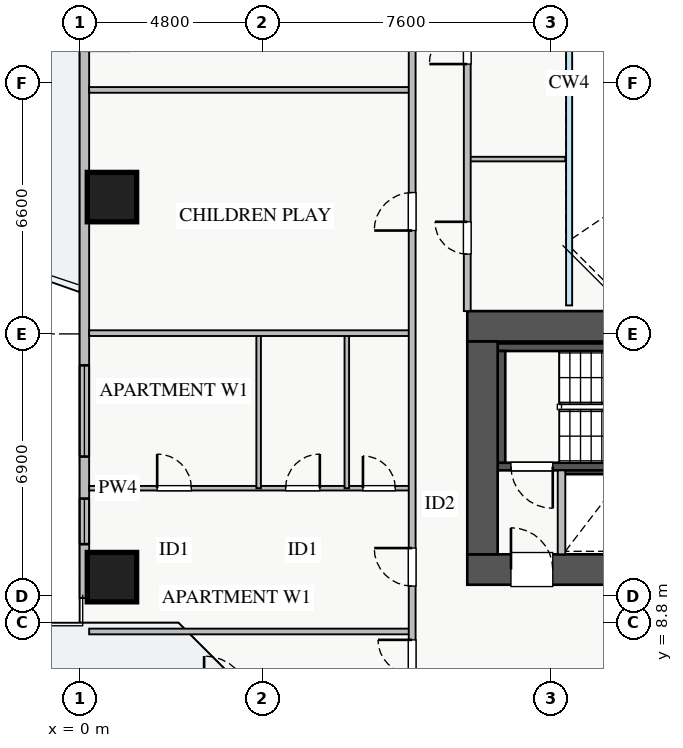
"""IFC4 building model, lengths in metres.
Left out: names, types, materials, properties, quantities, classifications, styles, units other than length and angle.
Written with IfcOpenShell. Run it as: python <this file> out.ifc"""

import sys

from ifc_helpers import new_model, si_unit, direction, frame, frame_2d, origin, origin_2d, place, context, subcontext, project, spatial, rectangle, extrude, source, transform, mapped, element, fill, save


model = new_model("IFC4")
c1 = context("Model", 3, precision=1e-05, world=origin(), true_north=direction((0.0, 1.0)))
c2 = subcontext(c1, "Body", "Model", "MODEL_VIEW")
j1 = project(units=[si_unit("LENGTHUNIT", "METRE"), si_unit("PLANEANGLEUNIT", "RADIAN")], contexts=[c1])
p1 = place(None, origin())
s1 = spatial("IfcSite", under=j1, at=p1, CompositionType="ELEMENT")
p2 = place(p1, origin())
s2 = spatial("IfcBuilding", under=s1, at=p2, CompositionType="ELEMENT")
p3 = place(p2, frame((0.0, 0.0, 63.25)))
s3 = spatial("IfcBuildingStorey", under=s2, at=p3, CompositionType="ELEMENT", Elevation=63.25)
p4 = place(p3, frame((12.68, 12.8, 0.0), z_axis=(0.0, 0.0, 1.0), x_axis=(1.0, 0.0, 0.0)))
e1 = element("IfcWall", 1, at=p4, inside=s3, PredefinedType="SHEAR", context=c2, shape_type="SweptSolid", body=[
    extrude(rectangle(XDim=1.94, YDim=0.18, at=frame_2d((0.97, 0.0))), origin(), (0.0, 0.0, 1.0), 3.07),
])
p5 = place(p3, frame((11.0, 12.91, 0.0), z_axis=(0.0, 0.0, 1.0), x_axis=(1.0, 0.0, 0.0)))
e2 = element("IfcWall", 2, at=p5, inside=s3, PredefinedType="SHEAR", context=c2, shape_type="SweptSolid", body=[
    extrude(rectangle(XDim=7.15, YDim=0.2, at=frame_2d((3.575, 0.0))), origin(), (0.0, 0.0, 1.0), 3.25),
])
p6 = place(p5, frame((0.35, 0.0, 0.0)))
e3 = element("IfcOpeningElement", 3, at=p6, cuts=e2, PredefinedType="OPENING", context=c2, shape_type="SweptSolid", body=[
    extrude(rectangle(XDim=1.1, YDim=2.05, at=frame_2d((0.55, 1.025))), frame((0.0, 0.11, 0.0), z_axis=(0.0, -1.0, 0.0), x_axis=(1.0, 0.0, 0.0)), (0.0, 0.0, 1.0), 0.22),
])
p7 = place(p3, frame((11.0, 16.05, 0.0), z_axis=(0.0, 0.0, 1.0), x_axis=(1.0, 0.0, 0.0)))
e4 = element("IfcWall", 4, at=p7, inside=s3, PredefinedType="SHEAR", context=c2, shape_type="SweptSolid", body=[
    extrude(rectangle(XDim=7.15, YDim=0.2, at=frame_2d((3.575, 0.0))), origin(), (0.0, 0.0, 1.0), 3.25),
])
p8 = place(p3, frame((11.1, 13.01, 0.0), z_axis=(0.0, 0.0, 1.0), x_axis=(0.0, 1.0, 0.0)))
e5 = element("IfcWall", 5, at=p8, inside=s3, PredefinedType="SHEAR", context=c2, shape_type="SweptSolid", body=[
    extrude(rectangle(XDim=2.94, YDim=0.2, at=frame_2d((1.47, 0.0))), origin(), (0.0, 0.0, 1.0), 3.25),
])
p9 = place(p3, frame((10.2, 10.2, 0.0), z_axis=(0.0, 0.0, 1.0), x_axis=(1.0, 0.0, 0.0)))
e6 = element("IfcWall", 6, at=p9, inside=s3, PredefinedType="SHEAR", context=c2, shape_type="SweptSolid", body=[
    extrude(rectangle(XDim=17.6, YDim=0.8, at=frame_2d((8.8, 0.0))), origin(), (0.0, 0.0, 1.0), 3.25),
])
p10 = place(p9, frame((1.15, 0.0, 0.0)))
e7 = element("IfcOpeningElement", 7, at=p10, cuts=e6, PredefinedType="OPENING", context=c2, shape_type="SweptSolid", body=[
    extrude(rectangle(XDim=1.1, YDim=2.05, at=frame_2d((0.55, 1.025))), frame((0.0, 0.41, 0.0), z_axis=(0.0, -1.0, 0.0), x_axis=(1.0, 0.0, 0.0)), (0.0, 0.0, 1.0), 0.82),
])
p11 = place(p9, frame((8.3, 0.0, 0.0)))
e8 = element("IfcOpeningElement", 8, at=p11, cuts=e6, PredefinedType="OPENING", context=c2, shape_type="SweptSolid", body=[
    extrude(rectangle(XDim=1.1, YDim=2.05, at=frame_2d((0.55, 1.025))), frame((0.0, 0.41, 0.0), z_axis=(0.0, -1.0, 0.0), x_axis=(1.0, 0.0, 0.0)), (0.0, 0.0, 1.0), 0.82),
])
p12 = place(p9, frame((10.05, 0.0, 0.0)))
e9 = element("IfcOpeningElement", 9, at=p12, cuts=e6, PredefinedType="OPENING", context=c2, shape_type="SweptSolid", body=[
    extrude(rectangle(XDim=1.1, YDim=2.05, at=frame_2d((0.55, 1.025))), frame((0.0, 0.41, 0.0), z_axis=(0.0, -1.0, 0.0), x_axis=(1.0, 0.0, 0.0)), (0.0, 0.0, 1.0), 0.82),
])
p13 = place(p9, frame((14.74, 0.0, 0.0)))
e10 = element("IfcOpeningElement", 10, at=p13, cuts=e6, PredefinedType="OPENING", context=c2, shape_type="SweptSolid", body=[
    extrude(rectangle(XDim=1.0, YDim=2.05, at=frame_2d((0.5, 1.025))), frame((0.0, 0.41, 0.0), z_axis=(0.0, -1.0, 0.0), x_axis=(1.0, 0.0, 0.0)), (0.0, 0.0, 1.0), 0.82),
])
p14 = place(p9, frame((11.835, 0.0, 0.0)))
e11 = element("IfcOpeningElement", 11, at=p14, cuts=e6, PredefinedType="OPENING", context=c2, shape_type="SweptSolid", body=[
    extrude(rectangle(XDim=1.0, YDim=2.05, at=frame_2d((0.5, 1.025))), frame((0.0, 0.41, 0.0), z_axis=(0.0, -1.0, 0.0), x_axis=(1.0, 0.0, 0.0)), (0.0, 0.0, 1.0), 0.82),
])
p15 = place(p9, frame((13.37, 0.0, 0.0)))
e12 = element("IfcOpeningElement", 12, at=p15, cuts=e6, PredefinedType="OPENING", context=c2, shape_type="SweptSolid", body=[
    extrude(rectangle(XDim=1.0, YDim=2.05, at=frame_2d((0.5, 1.025))), frame((0.0, 0.41, 0.0), z_axis=(0.0, -1.0, 0.0), x_axis=(1.0, 0.0, 0.0)), (0.0, 0.0, 1.0), 0.82),
])
p16 = place(p3, frame((10.2, 16.6, 0.0), z_axis=(0.0, 0.0, 1.0), x_axis=(1.0, 0.0, 0.0)))
e13 = element("IfcWall", 13, at=p16, inside=s3, PredefinedType="SHEAR", context=c2, shape_type="SweptSolid", body=[
    extrude(rectangle(XDim=17.6, YDim=0.8, at=frame_2d((8.8, 0.0))), origin(), (0.0, 0.0, 1.0), 3.25),
])
p17 = place(p3, frame((10.6, 10.6, 0.0), z_axis=(0.0, 0.0, 1.0), x_axis=(0.0, 1.0, 0.0)))
e14 = element("IfcWall", 14, at=p17, inside=s3, PredefinedType="SHEAR", context=c2, shape_type="SweptSolid", body=[
    extrude(rectangle(XDim=5.6, YDim=0.8, at=frame_2d((2.8, 0.0))), origin(), (0.0, 0.0, 1.0), 3.25),
])
m1 = source(origin(), c2, "Body", "SweptSolid", [
    extrude(rectangle(XDim=1.3, YDim=1.3, at=origin_2d()), origin(), (0.0, 0.0, 1.0), 3.25),
])
for number, where, z_axis, x_axis in (
    (15, (0.85, 20.0, 0.0), (0.0, 0.0, 1.0), (1.0, 0.0, 0.0)),
    (16, (0.85, 10.0, 0.0), (0.0, 0.0, 1.0), (1.0, 0.0, 0.0)),
):
    element("IfcColumn", number, at=place(p3, frame(where, z_axis=z_axis, x_axis=x_axis)), inside=s3, PredefinedType="COLUMN", context=c2, shape_type="MappedRepresentation", body=[
        mapped(m1, transform((0.0, 0.0, 0.0), x_axis=(1.0, 0.0, 0.0), y_axis=(0.0, 1.0, 0.0), z_axis=(0.0, 0.0, 1.0), scale=1.0)),
    ])
p18 = place(p3, frame((0.125, 9.45, 0.0), z_axis=(0.0, 0.0, 1.0), x_axis=(0.0, 1.0, 0.0)))
e17 = element("IfcWall", 17, at=p18, inside=s3, PredefinedType="STANDARD", context=c2, shape_type="SweptSolid", body=[
    extrude(rectangle(XDim=27.1, YDim=0.25, at=frame_2d((13.55, 0.0))), origin(), (0.0, 0.0, 1.0), 2.61),
])
p19 = place(p18, frame((14.4, 0.0, 0.0)))
e18 = element("IfcOpeningElement", 18, at=p19, cuts=e17, PredefinedType="OPENING", context=c2, shape_type="SweptSolid", body=[
    extrude(rectangle(XDim=1.2, YDim=2.1, at=frame_2d((0.6, 1.05))), frame((0.0, 0.135, 0.0), z_axis=(0.0, -1.0, 0.0), x_axis=(1.0, 0.0, 0.0)), (0.0, 0.0, 1.0), 0.27),
])
p20 = place(p18, frame((1.417, 0.0, 0.9)))
e19 = element("IfcOpeningElement", 19, at=p20, cuts=e17, PredefinedType="OPENING", context=c2, shape_type="SweptSolid", body=[
    extrude(rectangle(XDim=1.2, YDim=1.4, at=frame_2d((0.6, 0.7))), frame((0.0, 0.135, 0.0), z_axis=(0.0, -1.0, 0.0), x_axis=(1.0, 0.0, 0.0)), (0.0, 0.0, 1.0), 0.27),
])
p21 = place(p18, frame((24.188, 0.0, 0.9)))
e20 = element("IfcOpeningElement", 20, at=p21, cuts=e17, PredefinedType="OPENING", context=c2, shape_type="SweptSolid", body=[
    extrude(rectangle(XDim=1.5, YDim=1.5, at=frame_2d((0.75, 0.75))), frame((0.0, 0.135, 0.0), z_axis=(0.0, -1.0, 0.0), x_axis=(1.0, 0.0, 0.0)), (0.0, 0.0, 1.0), 0.27),
])
p22 = place(p18, frame((3.722, 0.0, 0.9)))
e21 = element("IfcOpeningElement", 21, at=p22, cuts=e17, PredefinedType="OPENING", context=c2, shape_type="SweptSolid", body=[
    extrude(rectangle(XDim=2.4, YDim=1.5, at=frame_2d((1.2, 0.75))), frame((0.0, 0.135, 0.0), z_axis=(0.0, -1.0, 0.0), x_axis=(1.0, 0.0, 0.0)), (0.0, 0.0, 1.0), 0.27),
])
p23 = place(p18, frame((21.018, 0.0, 0.9)))
e22 = element("IfcOpeningElement", 22, at=p23, cuts=e17, PredefinedType="OPENING", context=c2, shape_type="SweptSolid", body=[
    extrude(rectangle(XDim=2.4, YDim=1.5, at=frame_2d((1.2, 0.75))), frame((0.0, 0.135, 0.0), z_axis=(0.0, -1.0, 0.0), x_axis=(1.0, 0.0, 0.0)), (0.0, 0.0, 1.0), 0.27),
])
p24 = place(p18, frame((18.6, 0.0, 0.9)))
e23 = element("IfcOpeningElement", 23, at=p24, cuts=e17, PredefinedType="OPENING", context=c2, shape_type="SweptSolid", body=[
    extrude(rectangle(XDim=0.9, YDim=1.2, at=frame_2d((0.45, 0.6))), frame((0.0, 0.135, 0.0), z_axis=(0.0, -1.0, 0.0), x_axis=(1.0, 0.0, 0.0)), (0.0, 0.0, 1.0), 0.27),
])
p25 = place(p3, frame((12.68, 10.6, 0.0), z_axis=(0.0, 0.0, 1.0), x_axis=(0.0, 1.0, 0.0)))
e24 = element("IfcWall", 24, at=p25, inside=s3, PredefinedType="PARTITIONING", context=c2, shape_type="SweptSolid", body=[
    extrude(rectangle(XDim=2.21, YDim=0.2, at=frame_2d((1.105, 0.0))), origin(), (0.0, 0.0, 1.0), 3.07),
])
p26 = place(p3, frame((0.25, 8.57, 0.0), z_axis=(0.0, 0.0, 1.0), x_axis=(1.0, 0.0, 0.0)))
e25 = element("IfcWall", 25, at=p26, inside=s3, PredefinedType="PARTITIONING", context=c2, shape_type="SweptSolid", body=[
    extrude(rectangle(XDim=8.5, YDim=0.15, at=frame_2d((4.25, 0.0))), origin(), (0.0, 0.0, 1.0), 3.07),
])
p27 = place(p3, frame((0.25, 12.34, 0.0), z_axis=(0.0, 0.0, 1.0), x_axis=(1.0, 0.0, 0.0)))
e26 = element("IfcWall", 26, at=p27, inside=s3, PredefinedType="PLUMBINGWALL", context=c2, shape_type="SweptSolid", body=[
    extrude(rectangle(XDim=8.5, YDim=0.12, at=frame_2d((4.25, 0.0))), origin(), (0.0, 0.0, 1.0), 3.07),
])
p28 = place(p27, frame((1.79, 0.0, 0.0)))
e27 = element("IfcOpeningElement", 27, at=p28, cuts=e26, PredefinedType="OPENING", context=c2, shape_type="SweptSolid", body=[
    extrude(rectangle(XDim=0.9, YDim=2.05, at=frame_2d((0.45, 1.025))), frame((0.0, 0.07, 0.0), z_axis=(0.0, -1.0, 0.0), x_axis=(1.0, 0.0, 0.0)), (0.0, 0.0, 1.0), 0.14),
])
p29 = place(p27, frame((5.17, 0.0, 0.0)))
e28 = element("IfcOpeningElement", 28, at=p29, cuts=e26, PredefinedType="OPENING", context=c2, shape_type="SweptSolid", body=[
    extrude(rectangle(XDim=0.9, YDim=2.05, at=frame_2d((0.45, 1.025))), frame((0.0, 0.07, 0.0), z_axis=(0.0, -1.0, 0.0), x_axis=(1.0, 0.0, 0.0)), (0.0, 0.0, 1.0), 0.14),
])
p30 = place(p27, frame((7.205, 0.0, 0.0)))
e29 = element("IfcOpeningElement", 29, at=p30, cuts=e26, PredefinedType="OPENING", context=c2, shape_type="SweptSolid", body=[
    extrude(rectangle(XDim=0.85, YDim=2.05, at=frame_2d((0.425, 1.025))), frame((0.0, 0.07, 0.0), z_axis=(0.0, -1.0, 0.0), x_axis=(1.0, 0.0, 0.0)), (0.0, 0.0, 1.0), 0.14),
])
for number, where, z_axis, x_axis in (
    (30, (4.71, 12.34, 0.0), (0.0, 0.0, 1.0), (0.0, 1.0, 0.0)),
    (31, (7.03, 12.34, 0.0), (0.0, 0.0, 1.0), (0.0, 1.0, 0.0)),
):
    element("IfcWall", number, at=place(p3, frame(where, z_axis=z_axis, x_axis=x_axis)), inside=s3, PredefinedType="PLUMBINGWALL", context=c2, shape_type="SweptSolid", body=[
        extrude(rectangle(XDim=4.08, YDim=0.12, at=frame_2d((2.04, 0.0))), origin(), (0.0, 0.0, 1.0), 3.07),
    ])
for number, where, z_axis, x_axis in (
    (32, (0.25, 16.42, 0.0), (0.0, 0.0, 1.0), (1.0, 0.0, 0.0)),
    (33, (0.25, 22.82, 0.0), (0.0, 0.0, 1.0), (1.0, 0.0, 0.0)),
):
    element("IfcWall", number, at=place(p3, frame(where, z_axis=z_axis, x_axis=x_axis)), inside=s3, PredefinedType="PARTITIONING", context=c2, shape_type="SweptSolid", body=[
        extrude(rectangle(XDim=8.5, YDim=0.15, at=frame_2d((4.25, 0.0))), origin(), (0.0, 0.0, 1.0), 3.07),
    ])
p31 = place(p3, frame((8.75, 7.21, 0.0), z_axis=(0.0, 0.0, 1.0), x_axis=(0.0, 1.0, 0.0)))
e34 = element("IfcWall", 34, at=p31, inside=s3, PredefinedType="PARTITIONING", context=c2, shape_type="SweptSolid", body=[
    extrude(rectangle(XDim=31.23, YDim=0.18, at=frame_2d((15.615, 0.0))), origin(), (0.0, 0.0, 1.0), 3.07),
])
p32 = place(p31, frame((30.09, 0.0, 0.0)))
e35 = element("IfcOpeningElement", 35, at=p32, cuts=e34, PredefinedType="OPENING", context=c2, shape_type="SweptSolid", body=[
    extrude(rectangle(XDim=0.9, YDim=2.05, at=frame_2d((0.45, 1.025))), frame((0.0, 0.1, 0.0), z_axis=(0.0, -1.0, 0.0), x_axis=(1.0, 0.0, 0.0)), (0.0, 0.0, 1.0), 0.2),
])
p33 = place(p31, frame((0.24, 0.0, 0.0)))
e36 = element("IfcOpeningElement", 36, at=p33, cuts=e34, PredefinedType="OPENING", context=c2, shape_type="SweptSolid", body=[
    extrude(rectangle(XDim=0.9, YDim=2.05, at=frame_2d((0.45, 1.025))), frame((0.0, 0.1, 0.0), z_axis=(0.0, -1.0, 0.0), x_axis=(1.0, 0.0, 0.0)), (0.0, 0.0, 1.0), 0.2),
])
p34 = place(p31, frame((2.555, 0.0, 0.0)))
e37 = element("IfcOpeningElement", 37, at=p34, cuts=e34, PredefinedType="OPENING", context=c2, shape_type="SweptSolid", body=[
    extrude(rectangle(XDim=1.0, YDim=2.05, at=frame_2d((0.5, 1.025))), frame((0.0, 0.1, 0.0), z_axis=(0.0, -1.0, 0.0), x_axis=(1.0, 0.0, 0.0)), (0.0, 0.0, 1.0), 0.2),
])
p35 = place(p31, frame((11.91, 0.0, 0.0)))
e38 = element("IfcOpeningElement", 38, at=p35, cuts=e34, PredefinedType="OPENING", context=c2, shape_type="SweptSolid", body=[
    extrude(rectangle(XDim=1.0, YDim=2.05, at=frame_2d((0.5, 1.025))), frame((0.0, 0.1, 0.0), z_axis=(0.0, -1.0, 0.0), x_axis=(1.0, 0.0, 0.0)), (0.0, 0.0, 1.0), 0.2),
])
p36 = place(p31, frame((17.425, 0.0, 0.0)))
e39 = element("IfcOpeningElement", 39, at=p36, cuts=e34, PredefinedType="OPENING", context=c2, shape_type="SweptSolid", body=[
    extrude(rectangle(XDim=1.0, YDim=2.05, at=frame_2d((0.5, 1.025))), frame((0.0, 0.1, 0.0), z_axis=(0.0, -1.0, 0.0), x_axis=(1.0, 0.0, 0.0)), (0.0, 0.0, 1.0), 0.2),
])
p37 = place(p31, frame((23.76, 0.0, 0.0)))
e40 = element("IfcOpeningElement", 40, at=p37, cuts=e34, PredefinedType="OPENING", context=c2, shape_type="SweptSolid", body=[
    extrude(rectangle(XDim=1.0, YDim=2.05, at=frame_2d((0.5, 1.025))), frame((0.0, 0.1, 0.0), z_axis=(0.0, -1.0, 0.0), x_axis=(1.0, 0.0, 0.0)), (0.0, 0.0, 1.0), 0.2),
])
p38 = place(p3, frame((10.2, 21.0, 0.0), z_axis=(0.0, 0.0, 1.0), x_axis=(1.0, 0.0, 0.0)))
e41 = element("IfcWall", 41, at=p38, inside=s3, PredefinedType="PLUMBINGWALL", context=c2, shape_type="SweptSolid", body=[
    extrude(rectangle(XDim=2.58, YDim=0.12, at=frame_2d((1.29, 0.0))), origin(), (0.0, 0.0, 1.0), 3.07),
])
p39 = place(p3, frame((10.2, 17.0, 0.0), z_axis=(0.0, 0.0, 1.0), x_axis=(0.0, 1.0, 0.0)))
e42 = element("IfcWall", 42, at=p39, inside=s3, PredefinedType="PARTITIONING", context=c2, shape_type="SweptSolid", body=[
    extrude(rectangle(XDim=12.0, YDim=0.18, at=frame_2d((6.0, 0.0))), origin(), (0.0, 0.0, 1.0), 3.07),
])
p40 = place(p39, frame((1.5, 0.0, 0.0)))
e43 = element("IfcOpeningElement", 43, at=p40, cuts=e42, PredefinedType="OPENING", context=c2, shape_type="SweptSolid", body=[
    extrude(rectangle(XDim=0.85, YDim=2.05, at=frame_2d((0.425, 1.025))), frame((0.0, 0.1, 0.0), z_axis=(0.0, -1.0, 0.0), x_axis=(1.0, 0.0, 0.0)), (0.0, 0.0, 1.0), 0.2),
])
p41 = place(p39, frame((6.5, 0.0, 0.0)))
e44 = element("IfcOpeningElement", 44, at=p41, cuts=e42, PredefinedType="OPENING", context=c2, shape_type="SweptSolid", body=[
    extrude(rectangle(XDim=1.0, YDim=2.05, at=frame_2d((0.5, 1.025))), frame((0.0, 0.1, 0.0), z_axis=(0.0, -1.0, 0.0), x_axis=(1.0, 0.0, 0.0)), (0.0, 0.0, 1.0), 0.2),
])
m2 = source(origin(), c2, "Body", "SweptSolid", [
    extrude(rectangle(XDim=1.2, YDim=1.4, at=frame_2d((0.6, 0.7))), frame((0.0, 0.03, 0.0), z_axis=(0.0, -1.0, 0.0), x_axis=(1.0, 0.0, 0.0)), (0.0, 0.0, 1.0), 0.06),
])
p42 = place(p20, origin())
e45 = element("IfcWindow", 45, at=p42, inside=s3, PartitioningType="TRIPLE_PANEL_VERTICAL", PredefinedType="WINDOW", context=c2, shape_type="MappedRepresentation", body=[
    mapped(m2, transform((0.0, 0.0, 0.0), x_axis=(1.0, 0.0, 0.0), y_axis=(0.0, 1.0, 0.0), z_axis=(0.0, 0.0, 1.0), scale=1.0)),
])
fill(e19, e45)
m3 = source(origin(), c2, "Body", "SweptSolid", [
    extrude(rectangle(XDim=1.1, YDim=2.05, at=frame_2d((0.55, 1.025))), frame((0.0, 0.025, 0.0), z_axis=(0.0, -1.0, 0.0), x_axis=(1.0, 0.0, 0.0)), (0.0, 0.0, 1.0), 0.05),
])
p43 = place(p10, origin())
e46 = element("IfcDoor", 46, at=p43, inside=s3, OperationType="SINGLE_SWING_LEFT", PredefinedType="DOOR", context=c2, shape_type="MappedRepresentation", body=[
    mapped(m3, transform((0.0, 0.0, 0.0), x_axis=(1.0, 0.0, 0.0), y_axis=(0.0, 1.0, 0.0), z_axis=(0.0, 0.0, 1.0), scale=1.0)),
])
fill(e7, e46)
p44 = place(p6, frame((1.1, 0.0, 0.0), z_axis=(0.0, 0.0, 1.0), x_axis=(-1.0, 0.0, 0.0)))
e47 = element("IfcDoor", 47, at=p44, inside=s3, OperationType="SINGLE_SWING_RIGHT", PredefinedType="DOOR", context=c2, shape_type="MappedRepresentation", body=[
    mapped(m3, transform((0.0, 0.0, 0.0), x_axis=(1.0, 0.0, 0.0), y_axis=(0.0, 1.0, 0.0), z_axis=(0.0, 0.0, 1.0), scale=1.0)),
])
fill(e3, e47)
m4 = source(origin(), c2, "Body", "SweptSolid", [
    extrude(rectangle(XDim=0.9, YDim=2.05, at=frame_2d((0.45, 1.025))), frame((0.0, 0.025, 0.0), z_axis=(0.0, -1.0, 0.0), x_axis=(1.0, 0.0, 0.0)), (0.0, 0.0, 1.0), 0.05),
])
p45 = place(p28, origin())
e48 = element("IfcDoor", 48, at=p45, inside=s3, OperationType="SINGLE_SWING_LEFT", PredefinedType="DOOR", context=c2, shape_type="MappedRepresentation", body=[
    mapped(m4, transform((0.0, 0.0, 0.0), x_axis=(1.0, 0.0, 0.0), y_axis=(0.0, 1.0, 0.0), z_axis=(0.0, 0.0, 1.0), scale=1.0)),
])
fill(e27, e48)
p46 = place(p29, origin())
e49 = element("IfcDoor", 49, at=p46, inside=s3, OperationType="SINGLE_SWING_RIGHT", PredefinedType="DOOR", context=c2, shape_type="MappedRepresentation", body=[
    mapped(m4, transform((0.0, 0.0, 0.0), x_axis=(1.0, 0.0, 0.0), y_axis=(0.0, 1.0, 0.0), z_axis=(0.0, 0.0, 1.0), scale=1.0)),
])
fill(e28, e49)
m5 = source(origin(), c2, "Body", "SweptSolid", [
    extrude(rectangle(XDim=0.85, YDim=2.05, at=frame_2d((0.425, 1.025))), frame((0.0, 0.025, 0.0), z_axis=(0.0, -1.0, 0.0), x_axis=(1.0, 0.0, 0.0)), (0.0, 0.0, 1.0), 0.05),
])
p47 = place(p30, origin())
e50 = element("IfcDoor", 50, at=p47, inside=s3, OperationType="SINGLE_SWING_LEFT", PredefinedType="DOOR", context=c2, shape_type="MappedRepresentation", body=[
    mapped(m5, transform((0.0, 0.0, 0.0), x_axis=(1.0, 0.0, 0.0), y_axis=(0.0, 1.0, 0.0), z_axis=(0.0, 0.0, 1.0), scale=1.0)),
])
fill(e29, e50)
p48 = place(p33, origin())
e51 = element("IfcDoor", 51, at=p48, inside=s3, OperationType="SINGLE_SWING_RIGHT", PredefinedType="DOOR", context=c2, shape_type="MappedRepresentation", body=[
    mapped(m4, transform((0.0, 0.0, 0.0), x_axis=(1.0, 0.0, 0.0), y_axis=(0.0, 1.0, 0.0), z_axis=(0.0, 0.0, 1.0), scale=1.0)),
])
fill(e36, e51)
m6 = source(origin(), c2, "Body", "SweptSolid", [
    extrude(rectangle(XDim=1.0, YDim=2.05, at=frame_2d((0.5, 1.025))), frame((0.0, 0.025, 0.0), z_axis=(0.0, -1.0, 0.0), x_axis=(1.0, 0.0, 0.0)), (0.0, 0.0, 1.0), 0.05),
])
p49 = place(p34, origin())
e52 = element("IfcDoor", 52, at=p49, inside=s3, OperationType="SINGLE_SWING_RIGHT", PredefinedType="DOOR", context=c2, shape_type="MappedRepresentation", body=[
    mapped(m6, transform((0.0, 0.0, 0.0), x_axis=(1.0, 0.0, 0.0), y_axis=(0.0, 1.0, 0.0), z_axis=(0.0, 0.0, 1.0), scale=1.0)),
])
fill(e37, e52)
p50 = place(p35, origin())
e53 = element("IfcDoor", 53, at=p50, inside=s3, OperationType="SINGLE_SWING_LEFT", PredefinedType="DOOR", context=c2, shape_type="MappedRepresentation", body=[
    mapped(m6, transform((0.0, 0.0, 0.0), x_axis=(1.0, 0.0, 0.0), y_axis=(0.0, 1.0, 0.0), z_axis=(0.0, 0.0, 1.0), scale=1.0)),
])
fill(e38, e53)
p51 = place(p40, origin())
e54 = element("IfcDoor", 54, at=p51, inside=s3, OperationType="SINGLE_SWING_RIGHT", PredefinedType="DOOR", context=c2, shape_type="MappedRepresentation", body=[
    mapped(m5, transform((0.0, 0.0, 0.0), x_axis=(1.0, 0.0, 0.0), y_axis=(0.0, 1.0, 0.0), z_axis=(0.0, 0.0, 1.0), scale=1.0)),
])
fill(e43, e54)
p52 = place(p41, origin())
e55 = element("IfcDoor", 55, at=p52, inside=s3, OperationType="SINGLE_SWING_LEFT", PredefinedType="DOOR", context=c2, shape_type="MappedRepresentation", body=[
    mapped(m6, transform((0.0, 0.0, 0.0), x_axis=(1.0, 0.0, 0.0), y_axis=(0.0, 1.0, 0.0), z_axis=(0.0, 0.0, 1.0), scale=1.0)),
])
fill(e44, e55)
m7 = source(origin(), c2, "Body", "SweptSolid", [
    extrude(rectangle(XDim=2.4, YDim=1.5, at=frame_2d((1.2, 0.75))), frame((0.0, 0.03, 0.0), z_axis=(0.0, -1.0, 0.0), x_axis=(1.0, 0.0, 0.0)), (0.0, 0.0, 1.0), 0.06),
])
p53 = place(p22, origin())
e56 = element("IfcWindow", 56, at=p53, inside=s3, PartitioningType="TRIPLE_PANEL_VERTICAL", PredefinedType="WINDOW", context=c2, shape_type="MappedRepresentation", body=[
    mapped(m7, transform((0.0, 0.0, 0.0), x_axis=(1.0, 0.0, 0.0), y_axis=(0.0, 1.0, 0.0), z_axis=(0.0, 0.0, 1.0), scale=1.0)),
])
fill(e21, e56)
save(model, sys.argv[1])
